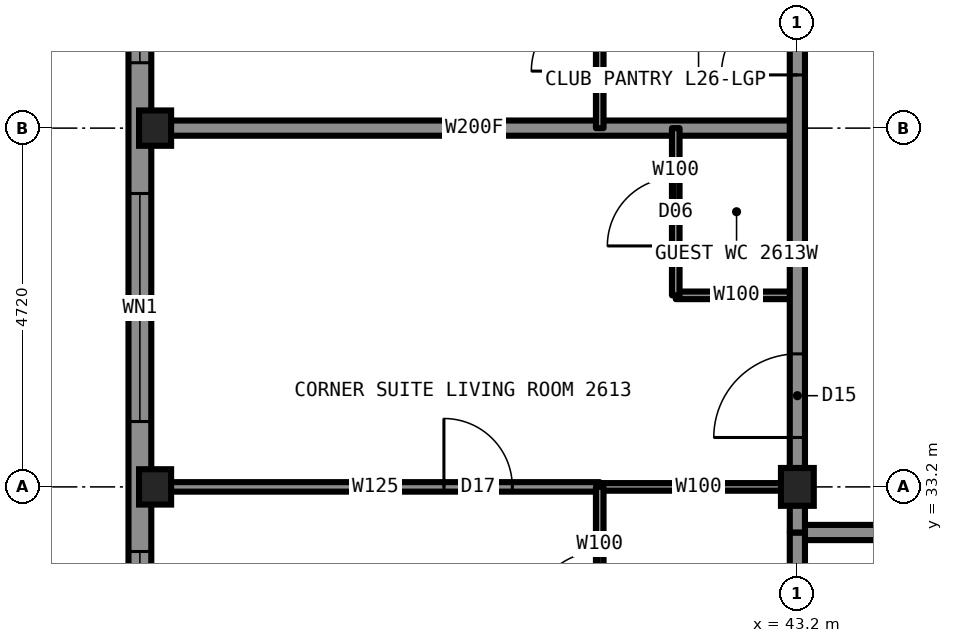
"""IFC4 building model, lengths in metres.
Left out: names, types, materials, properties, quantities, classifications, styles, units other than length and angle.
Written with IfcOpenShell. Run it as: python <this file> out.ifc"""

import sys

from ifc_helpers import new_model, si_unit, direction, frame, frame_2d, origin, origin_2d, place, context, subcontext, project, spatial, rectangle, i_section, extrude, element, fill, save


model = new_model("IFC4")
c1 = context("Model", 3, precision=1e-05, world=origin(), true_north=direction((0.0, 1.0)))
c2 = subcontext(c1, "Body", "Model", "MODEL_VIEW")
j1 = project(units=[si_unit("LENGTHUNIT", "METRE"), si_unit("PLANEANGLEUNIT", "RADIAN")], contexts=[c1])
p1 = place(None, origin())
s1 = spatial("IfcSite", under=j1, at=p1, CompositionType="ELEMENT")
p2 = place(p1, origin())
s2 = spatial("IfcBuilding", under=s1, at=p2, CompositionType="ELEMENT")
p3 = place(p2, frame((0.0, 0.0, 93.4)))
s3 = spatial("IfcBuildingStorey", under=s2, at=p3, CompositionType="ELEMENT", Elevation=93.4)
for number, where, z_axis, x_axis in (
    (1, (34.75, 33.2, 0.0), (0.0, 0.0, 1.0), (1.0, 0.0, 0.0)),
    (2, (34.75, 37.92, 0.0), (0.0, 0.0, 1.0), (1.0, 0.0, 0.0)),
):
    element("IfcColumn", number, at=place(p3, frame(where, z_axis=z_axis, x_axis=x_axis)), inside=s3, PredefinedType="COLUMN", context=c2, shape_type="SweptSolid", body=[
        extrude(i_section(OverallWidth=0.442, OverallDepth=0.531, WebThickness=0.066, FlangeThickness=0.106, at=origin_2d()), origin(), (0.0, 0.0, 1.0), 3.5),
    ])
p4 = place(p3, frame((43.2, 33.2, 0.0), z_axis=(0.0, 0.0, 1.0), x_axis=(1.0, 0.0, 0.0)))
e3 = element("IfcColumn", 3, at=p4, inside=s3, PredefinedType="COLUMN", context=c2, shape_type="SweptSolid", body=[
    extrude(i_section(OverallWidth=0.432, OverallDepth=0.498, WebThickness=0.056, FlangeThickness=0.089, at=origin_2d()), origin(), (0.0, 0.0, 1.0), 3.5),
])
p5 = place(p3, frame((40.6, 33.2, 0.0), z_axis=(0.0, 0.0, 1.0), x_axis=(1.0, 0.0, 0.0)))
e4 = element("IfcWall", 4, at=p5, inside=s3, PredefinedType="PARTITIONING", context=c2, shape_type="SweptSolid", body=[
    extrude(rectangle(XDim=2.6, YDim=0.1, at=frame_2d((1.3, 0.0))), origin(), (0.0, 0.0, 1.0), 2.573),
])
p6 = place(p3, frame((34.7, 33.2, 0.0), z_axis=(0.0, 0.0, 1.0), x_axis=(1.0, 0.0, 0.0)))
e5 = element("IfcWall", 5, at=p6, inside=s3, PredefinedType="PARTITIONING", context=c2, shape_type="SweptSolid", body=[
    extrude(rectangle(XDim=5.9, YDim=0.125, at=frame_2d((2.95, 0.0))), origin(), (0.0, 0.0, 1.0), 2.573),
])
p7 = place(p6, frame((3.85, 0.0, 0.0)))
e6 = element("IfcOpeningElement", 6, at=p7, cuts=e5, PredefinedType="OPENING", context=c2, shape_type="SweptSolid", body=[
    extrude(rectangle(XDim=0.9, YDim=2.2, at=frame_2d((0.45, 1.1))), frame((0.0, 0.073, 0.0), z_axis=(0.0, -1.0, 0.0), x_axis=(1.0, 0.0, 0.0)), (0.0, 0.0, 1.0), 0.145),
])
p8 = place(p3, frame((43.2, 32.6, 0.0), z_axis=(0.0, 0.0, 1.0), x_axis=(1.0, 0.0, 0.0)))
e7 = element("IfcWall", 7, at=p8, inside=s3, PredefinedType="PARTITIONING", context=c2, shape_type="SweptSolid", body=[
    extrude(rectangle(XDim=23.6, YDim=0.2, at=frame_2d((11.8, 0.0))), origin(), (0.0, 0.0, 1.0), 3.33),
])
p9 = place(p8, frame((3.0, 0.0, 0.0)))
e8 = element("IfcOpeningElement", 8, at=p9, cuts=e7, PredefinedType="OPENING", context=c2, shape_type="SweptSolid", body=[
    extrude(rectangle(XDim=1.0, YDim=2.2, at=frame_2d((0.5, 1.1))), frame((0.0, 0.11, 0.0), z_axis=(0.0, -1.0, 0.0), x_axis=(1.0, 0.0, 0.0)), (0.0, 0.0, 1.0), 0.22),
])
p10 = place(p8, frame((9.84, 0.0, 0.0)))
e9 = element("IfcOpeningElement", 9, at=p10, cuts=e7, PredefinedType="OPENING", context=c2, shape_type="SweptSolid", body=[
    extrude(rectangle(XDim=1.0, YDim=2.2, at=frame_2d((0.5, 1.1))), frame((0.0, 0.11, 0.0), z_axis=(0.0, -1.0, 0.0), x_axis=(1.0, 0.0, 0.0)), (0.0, 0.0, 1.0), 0.22),
])
p11 = place(p8, frame((17.16, 0.0, 0.0)))
e10 = element("IfcOpeningElement", 10, at=p11, cuts=e7, PredefinedType="OPENING", context=c2, shape_type="SweptSolid", body=[
    extrude(rectangle(XDim=1.0, YDim=2.2, at=frame_2d((0.5, 1.1))), frame((0.0, 0.11, 0.0), z_axis=(0.0, -1.0, 0.0), x_axis=(1.0, 0.0, 0.0)), (0.0, 0.0, 1.0), 0.22),
])
p12 = place(p3, frame((34.7, 37.92, 0.0), z_axis=(0.0, 0.0, 1.0), x_axis=(1.0, 0.0, 0.0)))
e11 = element("IfcWall", 11, at=p12, inside=s3, PredefinedType="PARTITIONING", context=c2, shape_type="SweptSolid", body=[
    extrude(rectangle(XDim=8.5, YDim=0.2, at=frame_2d((4.25, 0.0))), origin(), (0.0, 0.0, 1.0), 2.573),
])
p13 = place(p3, frame((41.6, 35.72, 0.0), z_axis=(0.0, 0.0, 1.0), x_axis=(1.0, 0.0, 0.0)))
e12 = element("IfcWall", 12, at=p13, inside=s3, PredefinedType="PARTITIONING", context=c2, shape_type="SweptSolid", body=[
    extrude(rectangle(XDim=1.6, YDim=0.1, at=frame_2d((0.8, 0.0))), origin(), (0.0, 0.0, 1.0), 3.33),
])
p14 = place(p3, frame((43.2, 33.22, 0.0), z_axis=(0.0, 0.0, 1.0), x_axis=(0.0, 1.0, 0.0)))
e13 = element("IfcWall", 13, at=p14, inside=s3, PredefinedType="PARTITIONING", context=c2, shape_type="SweptSolid", body=[
    extrude(rectangle(XDim=23.56, YDim=0.2, at=frame_2d((11.78, 0.0))), origin(), (0.0, 0.0, 1.0), 3.33),
])
p15 = place(p14, frame((16.4, 0.0, 0.0)))
e14 = element("IfcOpeningElement", 14, at=p15, cuts=e13, PredefinedType="OPENING", context=c2, shape_type="SweptSolid", body=[
    extrude(rectangle(XDim=1.0, YDim=2.2, at=frame_2d((0.5, 1.1))), frame((0.0, 0.11, 0.0), z_axis=(0.0, -1.0, 0.0), x_axis=(1.0, 0.0, 0.0)), (0.0, 0.0, 1.0), 0.22),
])
p16 = place(p14, frame((21.83, 0.0, 0.0)))
e15 = element("IfcOpeningElement", 15, at=p16, cuts=e13, PredefinedType="OPENING", context=c2, shape_type="SweptSolid", body=[
    extrude(rectangle(XDim=1.1, YDim=2.2, at=frame_2d((0.55, 1.1))), frame((0.0, 0.11, 0.0), z_axis=(0.0, -1.0, 0.0), x_axis=(1.0, 0.0, 0.0)), (0.0, 0.0, 1.0), 0.22),
])
p17 = place(p14, frame((0.63, 0.0, 0.0)))
e16 = element("IfcOpeningElement", 16, at=p17, cuts=e13, PredefinedType="OPENING", context=c2, shape_type="SweptSolid", body=[
    extrude(rectangle(XDim=1.1, YDim=2.2, at=frame_2d((0.55, 1.1))), frame((0.0, 0.11, 0.0), z_axis=(0.0, -1.0, 0.0), x_axis=(1.0, 0.0, 0.0)), (0.0, 0.0, 1.0), 0.22),
])
p18 = place(p14, frame((7.45, 0.0, 0.0)))
e17 = element("IfcOpeningElement", 17, at=p18, cuts=e13, PredefinedType="OPENING", context=c2, shape_type="SweptSolid", body=[
    extrude(rectangle(XDim=2.0, YDim=2.4, at=frame_2d((1.0, 1.2))), frame((0.0, 0.11, 0.0), z_axis=(0.0, -1.0, 0.0), x_axis=(1.0, 0.0, 0.0)), (0.0, 0.0, 1.0), 0.22),
])
p19 = place(p14, frame((5.4, 0.0, 0.0)))
e18 = element("IfcOpeningElement", 18, at=p19, cuts=e13, PredefinedType="OPENING", context=c2, shape_type="SweptSolid", body=[
    extrude(rectangle(XDim=1.0, YDim=2.1, at=frame_2d((0.5, 1.05))), frame((0.0, 0.11, 0.0), z_axis=(0.0, -1.0, 0.0), x_axis=(1.0, 0.0, 0.0)), (0.0, 0.0, 1.0), 0.22),
])
p20 = place(p3, frame((43.2, 24.7, 0.0), z_axis=(0.0, 0.0, 1.0), x_axis=(0.0, 1.0, 0.0)))
e19 = element("IfcWall", 19, at=p20, inside=s3, PredefinedType="PARTITIONING", context=c2, shape_type="SweptSolid", body=[
    extrude(rectangle(XDim=7.9, YDim=0.2, at=frame_2d((3.95, 0.0))), origin(), (0.0, 0.0, 1.0), 2.573),
])
p21 = place(p3, frame((41.6, 35.72, 0.0), z_axis=(0.0, 0.0, 1.0), x_axis=(0.0, 1.0, 0.0)))
e20 = element("IfcWall", 20, at=p21, inside=s3, PredefinedType="PARTITIONING", context=c2, shape_type="SweptSolid", body=[
    extrude(rectangle(XDim=2.2, YDim=0.1, at=frame_2d((1.1, 0.0))), origin(), (0.0, 0.0, 1.0), 3.33),
])
p22 = place(p21, frame((0.65, 0.0, 0.0)))
e21 = element("IfcOpeningElement", 21, at=p22, cuts=e20, PredefinedType="OPENING", context=c2, shape_type="SweptSolid", body=[
    extrude(rectangle(XDim=0.9, YDim=2.1, at=frame_2d((0.45, 1.05))), frame((0.0, 0.06, 0.0), z_axis=(0.0, -1.0, 0.0), x_axis=(1.0, 0.0, 0.0)), (0.0, 0.0, 1.0), 0.12),
])
p23 = place(p3, frame((40.6, 30.6, 0.0), z_axis=(0.0, 0.0, 1.0), x_axis=(0.0, 1.0, 0.0)))
e22 = element("IfcWall", 22, at=p23, inside=s3, PredefinedType="PARTITIONING", context=c2, shape_type="SweptSolid", body=[
    extrude(rectangle(XDim=2.6, YDim=0.1, at=frame_2d((1.3, 0.0))), origin(), (0.0, 0.0, 1.0), 3.33),
])
p24 = place(p23, frame((0.85, 0.0, 0.0)))
e23 = element("IfcOpeningElement", 23, at=p24, cuts=e22, PredefinedType="OPENING", context=c2, shape_type="SweptSolid", body=[
    extrude(rectangle(XDim=0.9, YDim=2.1, at=frame_2d((0.45, 1.05))), frame((0.0, 0.06, 0.0), z_axis=(0.0, -1.0, 0.0), x_axis=(1.0, 0.0, 0.0)), (0.0, 0.0, 1.0), 0.12),
])
p25 = place(p3, frame((40.6, 37.92, 0.0), z_axis=(0.0, 0.0, 1.0), x_axis=(0.0, 1.0, 0.0)))
e24 = element("IfcWall", 24, at=p25, inside=s3, PredefinedType="PARTITIONING", context=c2, shape_type="SweptSolid", body=[
    extrude(rectangle(XDim=2.4, YDim=0.1, at=frame_2d((1.2, 0.0))), origin(), (0.0, 0.0, 1.0), 3.33),
])
p26 = place(p25, frame((0.75, 0.0, 0.0)))
e25 = element("IfcOpeningElement", 25, at=p26, cuts=e24, PredefinedType="OPENING", context=c2, shape_type="SweptSolid", body=[
    extrude(rectangle(XDim=0.9, YDim=2.2, at=frame_2d((0.45, 1.1))), frame((0.0, 0.06, 0.0), z_axis=(0.0, -1.0, 0.0), x_axis=(1.0, 0.0, 0.0)), (0.0, 0.0, 1.0), 0.12),
])
p27 = place(p3, frame((34.55, 60.1, 0.0), z_axis=(0.0, 0.0, 1.0), x_axis=(0.0, -1.0, 0.0)))
e26 = element("IfcWall", 26, at=p27, inside=s3, PredefinedType="SOLIDWALL", context=c2, shape_type="SweptSolid", body=[
    extrude(rectangle(XDim=30.2, YDim=0.3, at=frame_2d((15.1, 0.0))), origin(), (0.0, 0.0, 1.0), 2.83),
])
p28 = place(p27, frame((0.85, 0.0, 0.5)))
e27 = element("IfcOpeningElement", 27, at=p28, cuts=e26, PredefinedType="OPENING", context=c2, shape_type="SweptSolid", body=[
    extrude(rectangle(XDim=1.6, YDim=2.0, at=frame_2d((0.8, 1.0))), frame((0.0, 0.16, 0.0), z_axis=(0.0, -1.0, 0.0), x_axis=(1.0, 0.0, 0.0)), (0.0, 0.0, 1.0), 0.32),
])
p29 = place(p27, frame((4.16, 0.0, 0.5)))
e28 = element("IfcOpeningElement", 28, at=p29, cuts=e26, PredefinedType="OPENING", context=c2, shape_type="SweptSolid", body=[
    extrude(rectangle(XDim=3.0, YDim=2.0, at=frame_2d((1.5, 1.0))), frame((0.0, 0.16, 0.0), z_axis=(0.0, -1.0, 0.0), x_axis=(1.0, 0.0, 0.0)), (0.0, 0.0, 1.0), 0.32),
])
p30 = place(p27, frame((8.88, 0.0, 0.5)))
e29 = element("IfcOpeningElement", 29, at=p30, cuts=e26, PredefinedType="OPENING", context=c2, shape_type="SweptSolid", body=[
    extrude(rectangle(XDim=3.0, YDim=2.0, at=frame_2d((1.5, 1.0))), frame((0.0, 0.16, 0.0), z_axis=(0.0, -1.0, 0.0), x_axis=(1.0, 0.0, 0.0)), (0.0, 0.0, 1.0), 0.32),
])
p31 = place(p27, frame((13.6, 0.0, 0.5)))
e30 = element("IfcOpeningElement", 30, at=p31, cuts=e26, PredefinedType="OPENING", context=c2, shape_type="SweptSolid", body=[
    extrude(rectangle(XDim=3.0, YDim=2.0, at=frame_2d((1.5, 1.0))), frame((0.0, 0.16, 0.0), z_axis=(0.0, -1.0, 0.0), x_axis=(1.0, 0.0, 0.0)), (0.0, 0.0, 1.0), 0.32),
])
p32 = place(p27, frame((18.32, 0.0, 0.5)))
e31 = element("IfcOpeningElement", 31, at=p32, cuts=e26, PredefinedType="OPENING", context=c2, shape_type="SweptSolid", body=[
    extrude(rectangle(XDim=3.0, YDim=2.0, at=frame_2d((1.5, 1.0))), frame((0.0, 0.16, 0.0), z_axis=(0.0, -1.0, 0.0), x_axis=(1.0, 0.0, 0.0)), (0.0, 0.0, 1.0), 0.32),
])
p33 = place(p27, frame((23.04, 0.0, 0.5)))
e32 = element("IfcOpeningElement", 32, at=p33, cuts=e26, PredefinedType="OPENING", context=c2, shape_type="SweptSolid", body=[
    extrude(rectangle(XDim=3.0, YDim=2.0, at=frame_2d((1.5, 1.0))), frame((0.0, 0.16, 0.0), z_axis=(0.0, -1.0, 0.0), x_axis=(1.0, 0.0, 0.0)), (0.0, 0.0, 1.0), 0.32),
])
p34 = place(p27, frame((27.75, 0.0, 0.5)))
e33 = element("IfcOpeningElement", 33, at=p34, cuts=e26, PredefinedType="OPENING", context=c2, shape_type="SweptSolid", body=[
    extrude(rectangle(XDim=1.6, YDim=2.0, at=frame_2d((0.8, 1.0))), frame((0.0, 0.16, 0.0), z_axis=(0.0, -1.0, 0.0), x_axis=(1.0, 0.0, 0.0)), (0.0, 0.0, 1.0), 0.32),
])
p35 = place(p3, frame((43.2, 32.6, 0.0), z_axis=(0.0, 0.0, 1.0), x_axis=(0.0, 1.0, 0.0)))
e34 = element("IfcWall", 34, at=p35, inside=s3, PredefinedType="PARTITIONING", context=c2, shape_type="SweptSolid", body=[
    extrude(rectangle(XDim=0.62, YDim=0.2, at=frame_2d((0.31, 0.0))), origin(), (0.0, 0.0, 1.0), 2.573),
])
p36 = place(p17, origin())
e35 = element("IfcDoor", 35, at=p36, inside=s3, OperationType="SINGLE_SWING_LEFT", PredefinedType="DOOR", context=c2, shape_type="SweptSolid", body=[
    extrude(rectangle(XDim=1.1, YDim=2.2, at=frame_2d((0.55, 1.1))), frame((0.0, 0.025, 0.0), z_axis=(0.0, -1.0, 0.0), x_axis=(1.0, 0.0, 0.0)), (0.0, 0.0, 1.0), 0.05),
])
fill(e16, e35)
p37 = place(p24, origin())
e36 = element("IfcDoor", 36, at=p37, inside=s3, OperationType="SINGLE_SWING_RIGHT", PredefinedType="DOOR", context=c2, shape_type="SweptSolid", body=[
    extrude(rectangle(XDim=0.9, YDim=2.1, at=frame_2d((0.45, 1.05))), frame((0.0, 0.025, 0.0), z_axis=(0.0, -1.0, 0.0), x_axis=(1.0, 0.0, 0.0)), (0.0, 0.0, 1.0), 0.05),
])
fill(e23, e36)
p38 = place(p7, origin())
e37 = element("IfcDoor", 37, at=p38, inside=s3, OperationType="SINGLE_SWING_LEFT", PredefinedType="DOOR", context=c2, shape_type="SweptSolid", body=[
    extrude(rectangle(XDim=0.9, YDim=2.2, at=frame_2d((0.45, 1.1))), frame((0.0, 0.025, 0.0), z_axis=(0.0, -1.0, 0.0), x_axis=(1.0, 0.0, 0.0)), (0.0, 0.0, 1.0), 0.05),
])
fill(e6, e37)
p39 = place(p22, origin())
e38 = element("IfcDoor", 38, at=p39, inside=s3, OperationType="SINGLE_SWING_LEFT", PredefinedType="DOOR", context=c2, shape_type="SweptSolid", body=[
    extrude(rectangle(XDim=0.9, YDim=2.1, at=frame_2d((0.45, 1.05))), frame((0.0, 0.025, 0.0), z_axis=(0.0, -1.0, 0.0), x_axis=(1.0, 0.0, 0.0)), (0.0, 0.0, 1.0), 0.05),
])
fill(e21, e38)
p40 = place(p26, origin())
e39 = element("IfcDoor", 39, at=p40, inside=s3, OperationType="SINGLE_SWING_LEFT", PredefinedType="DOOR", context=c2, shape_type="SweptSolid", body=[
    extrude(rectangle(XDim=0.9, YDim=2.2, at=frame_2d((0.45, 1.1))), frame((0.0, 0.025, 0.0), z_axis=(0.0, -1.0, 0.0), x_axis=(1.0, 0.0, 0.0)), (0.0, 0.0, 1.0), 0.05),
])
fill(e25, e39)
p41 = place(p19, origin())
e40 = element("IfcDoor", 40, at=p41, inside=s3, OperationType="SINGLE_SWING_LEFT", PredefinedType="DOOR", context=c2, shape_type="SweptSolid", body=[
    extrude(rectangle(XDim=1.0, YDim=2.1, at=frame_2d((0.5, 1.05))), frame((0.0, 0.025, 0.0), z_axis=(0.0, -1.0, 0.0), x_axis=(1.0, 0.0, 0.0)), (0.0, 0.0, 1.0), 0.05),
])
fill(e18, e40)
p42 = place(p32, origin())
e41 = element("IfcWindow", 41, at=p42, inside=s3, PartitioningType="SINGLE_PANEL", PredefinedType="WINDOW", context=c2, shape_type="SweptSolid", body=[
    extrude(rectangle(XDim=3.0, YDim=2.0, at=frame_2d((1.5, 1.0))), frame((0.0, 0.03, 0.0), z_axis=(0.0, -1.0, 0.0), x_axis=(1.0, 0.0, 0.0)), (0.0, 0.0, 1.0), 0.06),
])
fill(e31, e41)
p43 = place(p33, origin())
e42 = element("IfcWindow", 42, at=p43, inside=s3, PartitioningType="SINGLE_PANEL", PredefinedType="WINDOW", context=c2, shape_type="SweptSolid", body=[
    extrude(rectangle(XDim=3.0, YDim=2.0, at=frame_2d((1.5, 1.0))), frame((0.0, 0.03, 0.0), z_axis=(0.0, -1.0, 0.0), x_axis=(1.0, 0.0, 0.0)), (0.0, 0.0, 1.0), 0.06),
])
fill(e32, e42)
p44 = place(p34, origin())
e43 = element("IfcWindow", 43, at=p44, inside=s3, PartitioningType="SINGLE_PANEL", PredefinedType="WINDOW", context=c2, shape_type="SweptSolid", body=[
    extrude(rectangle(XDim=1.6, YDim=2.0, at=frame_2d((0.8, 1.0))), frame((0.0, 0.03, 0.0), z_axis=(0.0, -1.0, 0.0), x_axis=(1.0, 0.0, 0.0)), (0.0, 0.0, 1.0), 0.06),
])
fill(e33, e43)
save(model, sys.argv[1])
